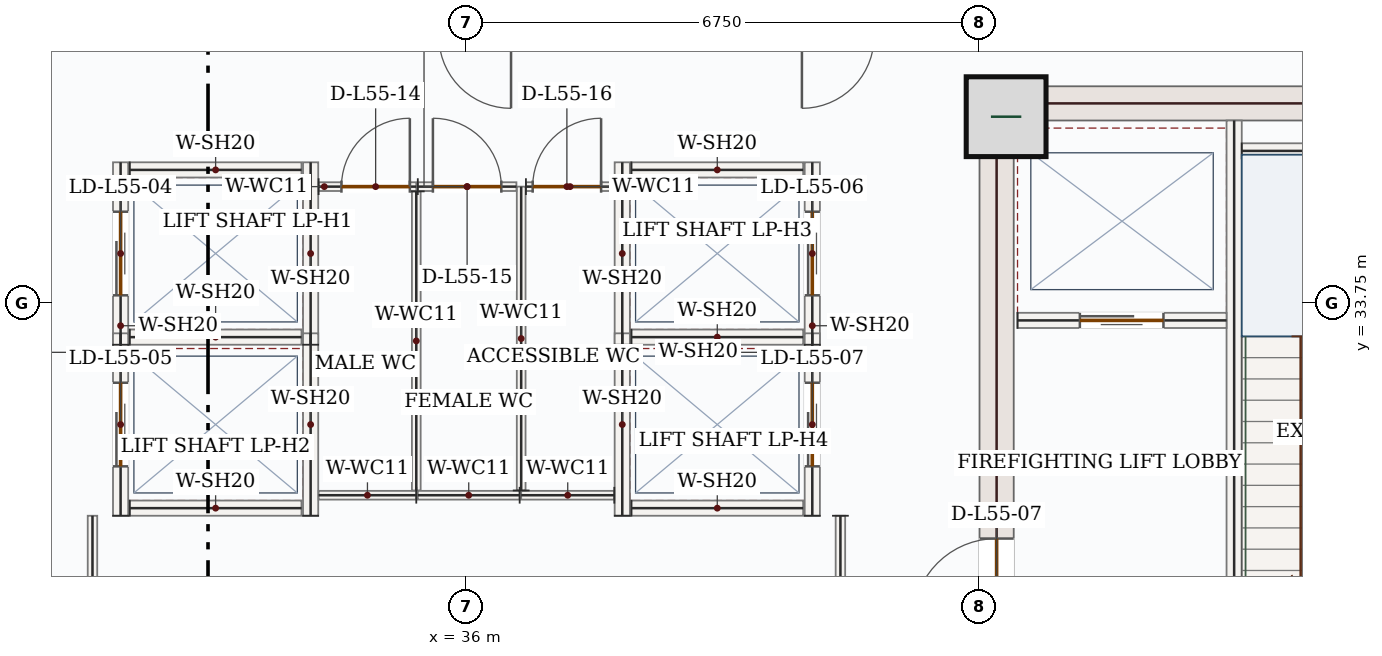
"""IFC4 building model, lengths in metres.
Left out: names, types, materials, properties, quantities, classifications, styles, units other than length and angle.
Written with IfcOpenShell. Run it as: python <this file> out.ifc"""

import sys

from ifc_helpers import new_model, si_unit, direction, frame, frame_2d, origin, origin_2d, place, context, subcontext, project, spatial, rectangle, extrude, source, transform, mapped, element, fill, save


model = new_model("IFC4")
c1 = context("Model", 3, precision=1e-05, world=origin(), true_north=direction((0.0, 1.0)))
c2 = subcontext(c1, "Body", "Model", "MODEL_VIEW")
j1 = project(units=[si_unit("LENGTHUNIT", "METRE"), si_unit("PLANEANGLEUNIT", "RADIAN")], contexts=[c1])
p1 = place(None, origin())
s1 = spatial("IfcSite", under=j1, at=p1, CompositionType="ELEMENT")
p2 = place(p1, origin())
s2 = spatial("IfcBuilding", under=s1, at=p2, CompositionType="ELEMENT")
p3 = place(p2, frame((0.0, 0.0, 234.3)))
s3 = spatial("IfcBuildingStorey", under=s2, at=p3, CompositionType="ELEMENT", Elevation=234.3)
p4 = place(p3, frame((42.975, 28.05, 0.0), z_axis=(0.0, 0.0, 1.0), x_axis=(0.0, 1.0, 0.0)))
e1 = element("IfcWall", 1, at=p4, inside=s3, PredefinedType="SHEAR", context=c2, shape_type="SweptSolid", body=[
    extrude(rectangle(XDim=8.55, YDim=0.45, at=frame_2d((4.275, 0.0))), origin(), (0.0, 0.0, 1.0), 4.55),
])
p5 = place(p4, frame((1.5, 0.0, 0.0)))
e2 = element("IfcOpeningElement", 2, at=p5, cuts=e1, PredefinedType="OPENING", context=c2, shape_type="SweptSolid", body=[
    extrude(rectangle(XDim=1.1, YDim=2.2, at=frame_2d((0.55, 1.1))), frame((0.0, 0.235, 0.0), z_axis=(0.0, -1.0, 0.0), x_axis=(1.0, 0.0, 0.0)), (0.0, 0.0, 1.0), 0.47),
])
m1 = source(origin(), c2, "Body", "SweptSolid", [
    extrude(rectangle(XDim=7.1, YDim=0.45, at=frame_2d((3.55, 0.0))), origin(), (0.0, 0.0, 1.0), 4.55),
])
p6 = place(p3, frame((43.2, 36.375, 0.0), z_axis=(0.0, 0.0, 1.0), x_axis=(1.0, 0.0, 0.0)))
e3 = element("IfcWall", 3, at=p6, inside=s3, PredefinedType="SHEAR", context=c2, shape_type="MappedRepresentation", body=[
    mapped(m1, transform((0.0, 0.0, 0.0), x_axis=(1.0, 0.0, 0.0), y_axis=(0.0, 1.0, 0.0), z_axis=(0.0, 0.0, 1.0), scale=1.0)),
])
m2 = source(origin(), c2, "Body", "SweptSolid", [
    extrude(rectangle(XDim=1.05, YDim=1.05, at=origin_2d()), origin(), (0.0, 0.0, 1.0), 4.8),
])
p7 = place(p3, frame((43.1, 36.2, 0.0), z_axis=(0.0, 0.0, 1.0), x_axis=(1.0, 0.0, 0.0)))
e4 = element("IfcColumn", 4, at=p7, inside=s3, PredefinedType="COLUMN", context=c2, shape_type="MappedRepresentation", body=[
    mapped(m2, transform((0.0, 0.0, 0.0), x_axis=(1.0, 0.0, 0.0), y_axis=(0.0, 1.0, 0.0), z_axis=(0.0, 0.0, 1.0), scale=1.0)),
])
p8 = place(p3, frame((46.1, 28.15, 0.0), z_axis=(0.0, 0.0, 1.0), x_axis=(0.0, 1.0, 0.0)))
e5 = element("IfcWall", 5, at=p8, inside=s3, PredefinedType="SOLIDWALL", context=c2, shape_type="SweptSolid", body=[
    extrude(rectangle(XDim=8.0, YDim=0.2, at=frame_2d((4.0, 0.0))), origin(), (0.0, 0.0, 1.0), 4.55),
])
p9 = place(p8, frame((0.4, 0.0, 0.0)))
e6 = element("IfcOpeningElement", 6, at=p9, cuts=e5, PredefinedType="OPENING", context=c2, shape_type="SweptSolid", body=[
    extrude(rectangle(XDim=1.05, YDim=2.15, at=frame_2d((0.525, 1.075))), frame((0.0, 0.11, 0.0), z_axis=(0.0, -1.0, 0.0), x_axis=(1.0, 0.0, 0.0)), (0.0, 0.0, 1.0), 0.22),
])
m3 = source(origin(), c2, "Body", "SweptSolid", [
    extrude(rectangle(XDim=3.25, YDim=0.2, at=frame_2d((1.625, 0.0))), origin(), (0.0, 0.0, 1.0), 4.55),
])
p10 = place(p3, frame((46.2, 35.75, 0.0), z_axis=(0.0, 0.0, 1.0), x_axis=(1.0, 0.0, 0.0)))
e7 = element("IfcWall", 7, at=p10, inside=s3, PredefinedType="SOLIDWALL", context=c2, shape_type="MappedRepresentation", body=[
    mapped(m3, transform((0.0, 0.0, 0.0), x_axis=(1.0, 0.0, 0.0), y_axis=(0.0, 1.0, 0.0), z_axis=(0.0, 0.0, 1.0), scale=1.0)),
])
p11 = place(p3, frame((43.25, 33.52, 0.0), z_axis=(0.0, 0.0, 1.0), x_axis=(1.0, 0.0, 0.0)))
e8 = element("IfcWall", 8, at=p11, inside=s3, PredefinedType="SOLIDWALL", context=c2, shape_type="SweptSolid", body=[
    extrude(rectangle(XDim=2.75, YDim=0.2, at=frame_2d((1.375, 0.0))), origin(), (0.0, 0.0, 1.0), 4.55),
])
p12 = place(p11, frame((0.82, 0.0, 0.0)))
e9 = element("IfcOpeningElement", 9, at=p12, cuts=e8, PredefinedType="OPENING", context=c2, shape_type="SweptSolid", body=[
    extrude(rectangle(XDim=1.1, YDim=2.15, at=frame_2d((0.55, 1.075))), frame((0.0, 0.11, 0.0), z_axis=(0.0, -1.0, 0.0), x_axis=(1.0, 0.0, 0.0)), (0.0, 0.0, 1.0), 0.22),
])
p13 = place(p3, frame((31.45, 33.2, 0.0), z_axis=(0.0, 0.0, 1.0), x_axis=(0.0, 1.0, 0.0)))
e10 = element("IfcWall", 10, at=p13, inside=s3, PredefinedType="SOLIDWALL", context=c2, shape_type="SweptSolid", body=[
    extrude(rectangle(XDim=2.4, YDim=0.2, at=frame_2d((1.2, 0.0))), origin(), (0.0, 0.0, 1.0), 4.55),
])
p14 = place(p13, frame((0.65, 0.0, 0.0)))
e11 = element("IfcOpeningElement", 11, at=p14, cuts=e10, PredefinedType="OPENING", context=c2, shape_type="SweptSolid", body=[
    extrude(rectangle(XDim=1.1, YDim=2.15, at=frame_2d((0.55, 1.075))), frame((0.0, 0.11, 0.0), z_axis=(0.0, -1.0, 0.0), x_axis=(1.0, 0.0, 0.0)), (0.0, 0.0, 1.0), 0.22),
])
m4 = source(origin(), c2, "Body", "SweptSolid", [
    extrude(rectangle(XDim=2.4, YDim=0.2, at=frame_2d((1.2, 0.0))), origin(), (0.0, 0.0, 1.0), 4.55),
])
p15 = place(p3, frame((33.95, 33.2, 0.0), z_axis=(0.0, 0.0, 1.0), x_axis=(0.0, 1.0, 0.0)))
e12 = element("IfcWall", 12, at=p15, inside=s3, PredefinedType="SOLIDWALL", context=c2, shape_type="MappedRepresentation", body=[
    mapped(m4, transform((0.0, 0.0, 0.0), x_axis=(1.0, 0.0, 0.0), y_axis=(0.0, 1.0, 0.0), z_axis=(0.0, 0.0, 1.0), scale=1.0)),
])
m5 = source(origin(), c2, "Body", "SweptSolid", [
    extrude(rectangle(XDim=2.26, YDim=0.2, at=frame_2d((1.13, 0.0))), origin(), (0.0, 0.0, 1.0), 4.55),
])
for number, where, z_axis, x_axis in (
    (13, (31.57, 33.3, 0.0), (0.0, 0.0, 1.0), (1.0, 0.0, 0.0)),
    (14, (31.57, 35.5, 0.0), (0.0, 0.0, 1.0), (1.0, 0.0, 0.0)),
):
    element("IfcWall", number, at=place(p3, frame(where, z_axis=z_axis, x_axis=x_axis)), inside=s3, PredefinedType="SOLIDWALL", context=c2, shape_type="MappedRepresentation", body=[
        mapped(m5, transform((0.0, 0.0, 0.0), x_axis=(1.0, 0.0, 0.0), y_axis=(0.0, 1.0, 0.0), z_axis=(0.0, 0.0, 1.0), scale=1.0)),
    ])
p16 = place(p3, frame((31.45, 30.95, 0.0), z_axis=(0.0, 0.0, 1.0), x_axis=(0.0, 1.0, 0.0)))
e15 = element("IfcWall", 15, at=p16, inside=s3, PredefinedType="SOLIDWALL", context=c2, shape_type="SweptSolid", body=[
    extrude(rectangle(XDim=2.4, YDim=0.2, at=frame_2d((1.2, 0.0))), origin(), (0.0, 0.0, 1.0), 4.55),
])
p17 = place(p16, frame((0.65, 0.0, 0.0)))
e16 = element("IfcOpeningElement", 16, at=p17, cuts=e15, PredefinedType="OPENING", context=c2, shape_type="SweptSolid", body=[
    extrude(rectangle(XDim=1.1, YDim=2.15, at=frame_2d((0.55, 1.075))), frame((0.0, 0.11, 0.0), z_axis=(0.0, -1.0, 0.0), x_axis=(1.0, 0.0, 0.0)), (0.0, 0.0, 1.0), 0.22),
])
p18 = place(p3, frame((33.95, 30.95, 0.0), z_axis=(0.0, 0.0, 1.0), x_axis=(0.0, 1.0, 0.0)))
e17 = element("IfcWall", 17, at=p18, inside=s3, PredefinedType="SOLIDWALL", context=c2, shape_type="MappedRepresentation", body=[
    mapped(m4, transform((0.0, 0.0, 0.0), x_axis=(1.0, 0.0, 0.0), y_axis=(0.0, 1.0, 0.0), z_axis=(0.0, 0.0, 1.0), scale=1.0)),
])
p19 = place(p3, frame((31.57, 31.05, 0.0), z_axis=(0.0, 0.0, 1.0), x_axis=(1.0, 0.0, 0.0)))
e18 = element("IfcWall", 18, at=p19, inside=s3, PredefinedType="SOLIDWALL", context=c2, shape_type="MappedRepresentation", body=[
    mapped(m5, transform((0.0, 0.0, 0.0), x_axis=(1.0, 0.0, 0.0), y_axis=(0.0, 1.0, 0.0), z_axis=(0.0, 0.0, 1.0), scale=1.0)),
])
p20 = place(p3, frame((38.05, 33.2, 0.0), z_axis=(0.0, 0.0, 1.0), x_axis=(0.0, 1.0, 0.0)))
e19 = element("IfcWall", 19, at=p20, inside=s3, PredefinedType="SOLIDWALL", context=c2, shape_type="MappedRepresentation", body=[
    mapped(m4, transform((0.0, 0.0, 0.0), x_axis=(1.0, 0.0, 0.0), y_axis=(0.0, 1.0, 0.0), z_axis=(0.0, 0.0, 1.0), scale=1.0)),
])
p21 = place(p3, frame((40.55, 33.2, 0.0), z_axis=(0.0, 0.0, 1.0), x_axis=(0.0, 1.0, 0.0)))
e20 = element("IfcWall", 20, at=p21, inside=s3, PredefinedType="SOLIDWALL", context=c2, shape_type="SweptSolid", body=[
    extrude(rectangle(XDim=2.4, YDim=0.2, at=frame_2d((1.2, 0.0))), origin(), (0.0, 0.0, 1.0), 4.55),
])
p22 = place(p21, frame((0.65, 0.0, 0.0)))
e21 = element("IfcOpeningElement", 21, at=p22, cuts=e20, PredefinedType="OPENING", context=c2, shape_type="SweptSolid", body=[
    extrude(rectangle(XDim=1.1, YDim=2.15, at=frame_2d((0.55, 1.075))), frame((0.0, 0.11, 0.0), z_axis=(0.0, -1.0, 0.0), x_axis=(1.0, 0.0, 0.0)), (0.0, 0.0, 1.0), 0.22),
])
for number, where, z_axis, x_axis in (
    (22, (38.17, 33.3, 0.0), (0.0, 0.0, 1.0), (1.0, 0.0, 0.0)),
    (23, (38.17, 35.5, 0.0), (0.0, 0.0, 1.0), (1.0, 0.0, 0.0)),
):
    element("IfcWall", number, at=place(p3, frame(where, z_axis=z_axis, x_axis=x_axis)), inside=s3, PredefinedType="SOLIDWALL", context=c2, shape_type="MappedRepresentation", body=[
        mapped(m5, transform((0.0, 0.0, 0.0), x_axis=(1.0, 0.0, 0.0), y_axis=(0.0, 1.0, 0.0), z_axis=(0.0, 0.0, 1.0), scale=1.0)),
    ])
p23 = place(p3, frame((38.05, 30.95, 0.0), z_axis=(0.0, 0.0, 1.0), x_axis=(0.0, 1.0, 0.0)))
e24 = element("IfcWall", 24, at=p23, inside=s3, PredefinedType="SOLIDWALL", context=c2, shape_type="MappedRepresentation", body=[
    mapped(m4, transform((0.0, 0.0, 0.0), x_axis=(1.0, 0.0, 0.0), y_axis=(0.0, 1.0, 0.0), z_axis=(0.0, 0.0, 1.0), scale=1.0)),
])
p24 = place(p3, frame((40.55, 30.95, 0.0), z_axis=(0.0, 0.0, 1.0), x_axis=(0.0, 1.0, 0.0)))
e25 = element("IfcWall", 25, at=p24, inside=s3, PredefinedType="SOLIDWALL", context=c2, shape_type="SweptSolid", body=[
    extrude(rectangle(XDim=2.4, YDim=0.2, at=frame_2d((1.2, 0.0))), origin(), (0.0, 0.0, 1.0), 4.55),
])
p25 = place(p24, frame((0.65, 0.0, 0.0)))
e26 = element("IfcOpeningElement", 26, at=p25, cuts=e25, PredefinedType="OPENING", context=c2, shape_type="SweptSolid", body=[
    extrude(rectangle(XDim=1.1, YDim=2.15, at=frame_2d((0.55, 1.075))), frame((0.0, 0.11, 0.0), z_axis=(0.0, -1.0, 0.0), x_axis=(1.0, 0.0, 0.0)), (0.0, 0.0, 1.0), 0.22),
])
p26 = place(p3, frame((38.17, 31.05, 0.0), z_axis=(0.0, 0.0, 1.0), x_axis=(1.0, 0.0, 0.0)))
e27 = element("IfcWall", 27, at=p26, inside=s3, PredefinedType="SOLIDWALL", context=c2, shape_type="MappedRepresentation", body=[
    mapped(m5, transform((0.0, 0.0, 0.0), x_axis=(1.0, 0.0, 0.0), y_axis=(0.0, 1.0, 0.0), z_axis=(0.0, 0.0, 1.0), scale=1.0)),
])
m6 = source(origin(), c2, "Body", "SweptSolid", [
    extrude(rectangle(XDim=1.225, YDim=0.115, at=frame_2d((0.613, 0.0))), origin(), (0.0, 0.0, 1.0), 4.55),
])
p27 = place(p3, frame((37.945, 31.22, 0.0), z_axis=(0.0, 0.0, 1.0), x_axis=(-1.0, 0.0, 0.0)))
e28 = element("IfcWall", 28, at=p27, inside=s3, PredefinedType="PARTITIONING", context=c2, shape_type="MappedRepresentation", body=[
    mapped(m6, transform((0.0, 0.0, 0.0), x_axis=(1.0, 0.0, 0.0), y_axis=(0.0, 1.0, 0.0), z_axis=(0.0, 0.0, 1.0), scale=1.0)),
])
m7 = source(origin(), c2, "Body", "SweptSolid", [
    extrude(rectangle(XDim=3.998, YDim=0.115, at=frame_2d((1.999, 0.0))), origin(), (0.0, 0.0, 1.0), 4.55),
])
p28 = place(p3, frame((36.72, 31.282, 0.0), z_axis=(0.0, 0.0, 1.0), x_axis=(0.0, 1.0, 0.0)))
e29 = element("IfcWall", 29, at=p28, inside=s3, PredefinedType="PARTITIONING", context=c2, shape_type="MappedRepresentation", body=[
    mapped(m7, transform((0.0, 0.0, 0.0), x_axis=(1.0, 0.0, 0.0), y_axis=(0.0, 1.0, 0.0), z_axis=(0.0, 0.0, 1.0), scale=1.0)),
])
p29 = place(p3, frame((36.782, 35.28, 0.0), z_axis=(0.0, 0.0, 1.0), x_axis=(1.0, 0.0, 0.0)))
e30 = element("IfcWall", 30, at=p29, inside=s3, PredefinedType="PARTITIONING", context=c2, shape_type="SweptSolid", body=[
    extrude(rectangle(XDim=1.163, YDim=0.115, at=frame_2d((0.581, 0.0))), origin(), (0.0, 0.0, 1.0), 4.55),
])
p30 = place(p29, frame((0.089, 0.0, 0.0)))
e31 = element("IfcOpeningElement", 31, at=p30, cuts=e30, PredefinedType="OPENING", context=c2, shape_type="SweptSolid", body=[
    extrude(rectangle(XDim=0.9, YDim=2.1, at=frame_2d((0.45, 1.05))), frame((0.0, 0.067, 0.0), z_axis=(0.0, -1.0, 0.0), x_axis=(1.0, 0.0, 0.0)), (0.0, 0.0, 1.0), 0.135),
])
m8 = source(origin(), c2, "Body", "SweptSolid", [
    extrude(rectangle(XDim=1.285, YDim=0.115, at=frame_2d((0.643, 0.0))), origin(), (0.0, 0.0, 1.0), 4.55),
])
p31 = place(p3, frame((35.34, 31.22, 0.0), z_axis=(0.0, 0.0, 1.0), x_axis=(-1.0, 0.0, 0.0)))
e32 = element("IfcWall", 32, at=p31, inside=s3, PredefinedType="PARTITIONING", context=c2, shape_type="MappedRepresentation", body=[
    mapped(m8, transform((0.0, 0.0, 0.0), x_axis=(1.0, 0.0, 0.0), y_axis=(0.0, 1.0, 0.0), z_axis=(0.0, 0.0, 1.0), scale=1.0)),
])
p32 = place(p3, frame((34.055, 35.28, 0.0), z_axis=(0.0, 0.0, 1.0), x_axis=(1.0, 0.0, 0.0)))
e33 = element("IfcWall", 33, at=p32, inside=s3, PredefinedType="PARTITIONING", context=c2, shape_type="SweptSolid", body=[
    extrude(rectangle(XDim=1.285, YDim=0.115, at=frame_2d((0.643, 0.0))), origin(), (0.0, 0.0, 1.0), 4.55),
])
p33 = place(p32, frame((0.3, 0.0, 0.0)))
e34 = element("IfcOpeningElement", 34, at=p33, cuts=e33, PredefinedType="OPENING", context=c2, shape_type="SweptSolid", body=[
    extrude(rectangle(XDim=0.9, YDim=2.1, at=frame_2d((0.45, 1.05))), frame((0.0, 0.067, 0.0), z_axis=(0.0, -1.0, 0.0), x_axis=(1.0, 0.0, 0.0)), (0.0, 0.0, 1.0), 0.135),
])
m9 = source(origin(), c2, "Body", "SweptSolid", [
    extrude(rectangle(XDim=3.935, YDim=0.115, at=frame_2d((1.968, 0.0))), origin(), (0.0, 0.0, 1.0), 4.55),
])
p34 = place(p3, frame((35.34, 35.218, 0.0), z_axis=(0.0, 0.0, 1.0), x_axis=(0.0, -1.0, 0.0)))
e35 = element("IfcWall", 35, at=p34, inside=s3, PredefinedType="PARTITIONING", context=c2, shape_type="MappedRepresentation", body=[
    mapped(m9, transform((0.0, 0.0, 0.0), x_axis=(1.0, 0.0, 0.0), y_axis=(0.0, 1.0, 0.0), z_axis=(0.0, 0.0, 1.0), scale=1.0)),
])
m10 = source(origin(), c2, "Body", "SweptSolid", [
    extrude(rectangle(XDim=1.34, YDim=0.115, at=frame_2d((0.67, 0.0))), origin(), (0.0, 0.0, 1.0), 4.55),
])
p35 = place(p3, frame((36.7, 31.22, 0.0), z_axis=(0.0, 0.0, 1.0), x_axis=(-1.0, 0.0, 0.0)))
e36 = element("IfcWall", 36, at=p35, inside=s3, PredefinedType="PARTITIONING", context=c2, shape_type="MappedRepresentation", body=[
    mapped(m10, transform((0.0, 0.0, 0.0), x_axis=(1.0, 0.0, 0.0), y_axis=(0.0, 1.0, 0.0), z_axis=(0.0, 0.0, 1.0), scale=1.0)),
])
p36 = place(p3, frame((35.36, 35.28, 0.0), z_axis=(0.0, 0.0, 1.0), x_axis=(1.0, 0.0, 0.0)))
e37 = element("IfcWall", 37, at=p36, inside=s3, PredefinedType="PARTITIONING", context=c2, shape_type="SweptSolid", body=[
    extrude(rectangle(XDim=1.297, YDim=0.115, at=frame_2d((0.649, 0.0))), origin(), (0.0, 0.0, 1.0), 4.55),
])
p37 = place(p36, frame((0.199, 0.0, 0.0)))
e38 = element("IfcOpeningElement", 38, at=p37, cuts=e37, PredefinedType="OPENING", context=c2, shape_type="SweptSolid", body=[
    extrude(rectangle(XDim=0.9, YDim=2.1, at=frame_2d((0.45, 1.05))), frame((0.0, 0.067, 0.0), z_axis=(0.0, -1.0, 0.0), x_axis=(1.0, 0.0, 0.0)), (0.0, 0.0, 1.0), 0.135),
])
m11 = source(origin(), c2, "Body", "SweptSolid", [
    extrude(rectangle(XDim=3.01, YDim=0.125, at=frame_2d((1.505, 0.0))), origin(), (0.0, 0.0, 1.0), 4.55),
])
p38 = place(p3, frame((40.92, 30.95, 0.0), z_axis=(0.0, 0.0, 1.0), x_axis=(0.0, -1.0, 0.0)))
e39 = element("IfcWall", 39, at=p38, inside=s3, PredefinedType="PARTITIONING", context=c2, shape_type="MappedRepresentation", body=[
    mapped(m11, transform((0.0, 0.0, 0.0), x_axis=(1.0, 0.0, 0.0), y_axis=(0.0, 1.0, 0.0), z_axis=(0.0, 0.0, 1.0), scale=1.0)),
])
m12 = source(origin(), c2, "Body", "SweptSolid", [
    extrude(rectangle(XDim=2.942, YDim=0.125, at=frame_2d((1.471, 0.0))), origin(), (0.0, 0.0, 1.0), 4.55),
])
p39 = place(p3, frame((31.08, 28.008, 0.0), z_axis=(0.0, 0.0, 1.0), x_axis=(0.0, 1.0, 0.0)))
e40 = element("IfcWall", 40, at=p39, inside=s3, PredefinedType="PARTITIONING", context=c2, shape_type="MappedRepresentation", body=[
    mapped(m12, transform((0.0, 0.0, 0.0), x_axis=(1.0, 0.0, 0.0), y_axis=(0.0, 1.0, 0.0), z_axis=(0.0, 0.0, 1.0), scale=1.0)),
])
m13 = source(origin(), c2, "Body", "SweptSolid", [
    extrude(rectangle(XDim=1.1, YDim=2.15, at=frame_2d((0.55, 1.075))), frame((0.0, 0.025, 0.0), z_axis=(0.0, -1.0, 0.0), x_axis=(1.0, 0.0, 0.0)), (0.0, 0.0, 1.0), 0.05),
])
p40 = place(p12, origin())
e41 = element("IfcDoor", 41, at=p40, inside=s3, OperationType="DOUBLE_DOOR_SLIDING", PredefinedType="DOOR", context=c2, shape_type="MappedRepresentation", body=[
    mapped(m13, transform((0.0, 0.0, 0.0), x_axis=(1.0, 0.0, 0.0), y_axis=(0.0, 1.0, 0.0), z_axis=(0.0, 0.0, 1.0), scale=1.0)),
])
fill(e9, e41)
m14 = source(origin(), c2, "Body", "SweptSolid", [
    extrude(rectangle(XDim=1.1, YDim=2.2, at=frame_2d((0.55, 1.1))), frame((0.0, 0.025, 0.0), z_axis=(0.0, -1.0, 0.0), x_axis=(1.0, 0.0, 0.0)), (0.0, 0.0, 1.0), 0.05),
])
p41 = place(p5, origin())
e42 = element("IfcDoor", 42, at=p41, inside=s3, OperationType="SINGLE_SWING_LEFT", PredefinedType="DOOR", context=c2, shape_type="MappedRepresentation", body=[
    mapped(m14, transform((0.0, 0.0, 0.0), x_axis=(1.0, 0.0, 0.0), y_axis=(0.0, 1.0, 0.0), z_axis=(0.0, 0.0, 1.0), scale=1.0)),
])
fill(e2, e42)
p42 = place(p14, origin())
e43 = element("IfcDoor", 43, at=p42, inside=s3, OperationType="DOUBLE_DOOR_SLIDING", PredefinedType="DOOR", context=c2, shape_type="MappedRepresentation", body=[
    mapped(m13, transform((0.0, 0.0, 0.0), x_axis=(1.0, 0.0, 0.0), y_axis=(0.0, 1.0, 0.0), z_axis=(0.0, 0.0, 1.0), scale=1.0)),
])
fill(e11, e43)
p43 = place(p17, origin())
e44 = element("IfcDoor", 44, at=p43, inside=s3, OperationType="DOUBLE_DOOR_SLIDING", PredefinedType="DOOR", context=c2, shape_type="MappedRepresentation", body=[
    mapped(m13, transform((0.0, 0.0, 0.0), x_axis=(1.0, 0.0, 0.0), y_axis=(0.0, 1.0, 0.0), z_axis=(0.0, 0.0, 1.0), scale=1.0)),
])
fill(e16, e44)
p44 = place(p22, origin())
e45 = element("IfcDoor", 45, at=p44, inside=s3, OperationType="DOUBLE_DOOR_SLIDING", PredefinedType="DOOR", context=c2, shape_type="MappedRepresentation", body=[
    mapped(m13, transform((0.0, 0.0, 0.0), x_axis=(1.0, 0.0, 0.0), y_axis=(0.0, 1.0, 0.0), z_axis=(0.0, 0.0, 1.0), scale=1.0)),
])
fill(e21, e45)
p45 = place(p25, origin())
e46 = element("IfcDoor", 46, at=p45, inside=s3, OperationType="DOUBLE_DOOR_SLIDING", PredefinedType="DOOR", context=c2, shape_type="MappedRepresentation", body=[
    mapped(m13, transform((0.0, 0.0, 0.0), x_axis=(1.0, 0.0, 0.0), y_axis=(0.0, 1.0, 0.0), z_axis=(0.0, 0.0, 1.0), scale=1.0)),
])
fill(e26, e46)
m15 = source(origin(), c2, "Body", "SweptSolid", [
    extrude(rectangle(XDim=0.9, YDim=2.1, at=frame_2d((0.45, 1.05))), frame((0.0, 0.025, 0.0), z_axis=(0.0, -1.0, 0.0), x_axis=(1.0, 0.0, 0.0)), (0.0, 0.0, 1.0), 0.05),
])
p46 = place(p33, origin())
e47 = element("IfcDoor", 47, at=p46, inside=s3, OperationType="SINGLE_SWING_RIGHT", PredefinedType="DOOR", context=c2, shape_type="MappedRepresentation", body=[
    mapped(m15, transform((0.0, 0.0, 0.0), x_axis=(1.0, 0.0, 0.0), y_axis=(0.0, 1.0, 0.0), z_axis=(0.0, 0.0, 1.0), scale=1.0)),
])
fill(e34, e47)
p47 = place(p37, origin())
e48 = element("IfcDoor", 48, at=p47, inside=s3, OperationType="SINGLE_SWING_LEFT", PredefinedType="DOOR", context=c2, shape_type="MappedRepresentation", body=[
    mapped(m15, transform((0.0, 0.0, 0.0), x_axis=(1.0, 0.0, 0.0), y_axis=(0.0, 1.0, 0.0), z_axis=(0.0, 0.0, 1.0), scale=1.0)),
])
fill(e38, e48)
p48 = place(p30, origin())
e49 = element("IfcDoor", 49, at=p48, inside=s3, OperationType="SINGLE_SWING_RIGHT", PredefinedType="DOOR", context=c2, shape_type="MappedRepresentation", body=[
    mapped(m15, transform((0.0, 0.0, 0.0), x_axis=(1.0, 0.0, 0.0), y_axis=(0.0, 1.0, 0.0), z_axis=(0.0, 0.0, 1.0), scale=1.0)),
])
fill(e31, e49)
save(model, sys.argv[1])
